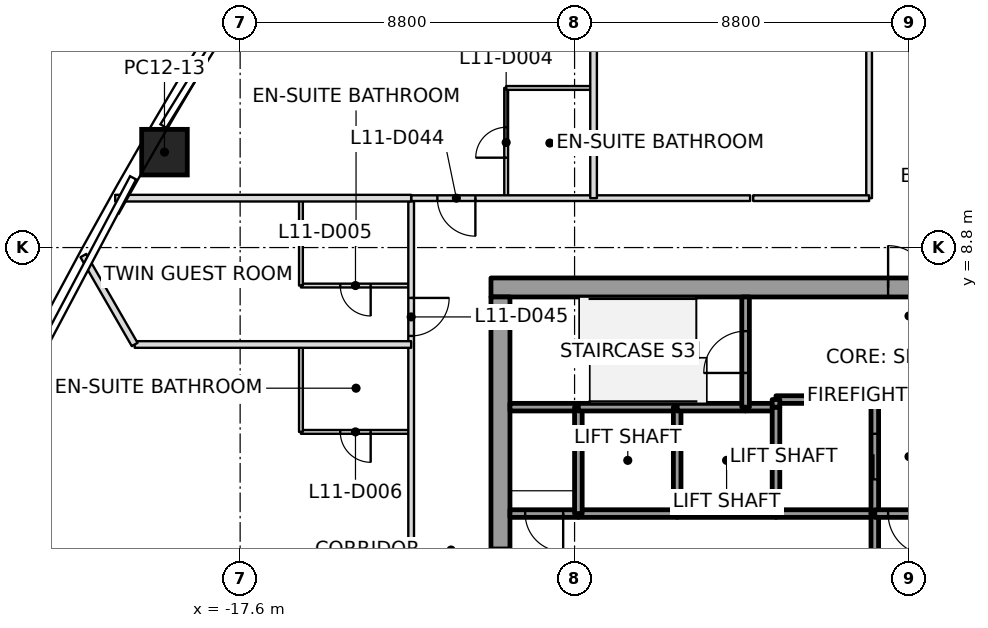
"""IFC4 building model, lengths in metres.
Left out: names, types, materials, properties, quantities, classifications, styles, units other than length and angle.
Written with IfcOpenShell. Run it as: python <this file> out.ifc"""

import sys

from ifc_helpers import new_model, si_unit, direction, frame, frame_2d, origin, origin_2d, place, context, subcontext, project, spatial, rectangle, extrude, element, fill, save


model = new_model("IFC4")
c1 = context("Model", 3, precision=1e-05, world=origin(), true_north=direction((0.0, 1.0)))
c2 = subcontext(c1, "Body", "Model", "MODEL_VIEW")
j1 = project(units=[si_unit("LENGTHUNIT", "METRE"), si_unit("PLANEANGLEUNIT", "RADIAN")], contexts=[c1])
p1 = place(None, origin())
s1 = spatial("IfcSite", under=j1, at=p1, CompositionType="ELEMENT")
p2 = place(p1, origin())
s2 = spatial("IfcBuilding", under=s1, at=p2, CompositionType="ELEMENT")
p3 = place(p2, frame((0.0, 0.0, 62.8)))
s3 = spatial("IfcBuildingStorey", under=s2, at=p3, CompositionType="ELEMENT", Elevation=62.8)
p4 = place(p3, frame((-19.591, 11.311, 0.0), z_axis=(0.010754697325, -0.00620209539, 0.999922932279), x_axis=(0.499971083285, 0.866042098195, -5.762411e-06)))
e1 = element("IfcColumn", 1, at=p4, inside=s3, PredefinedType="COLUMN", context=c2, shape_type="SweptSolid", body=[
    extrude(rectangle(XDim=1.2, YDim=1.2, at=origin_2d()), origin(), (0.0, 0.0, 1.0), 3.7),
])
p5 = place(p3, frame((-11.0, 7.75, 0.0), z_axis=(0.0, 0.0, 1.0), x_axis=(1.0, 0.0, 0.0)))
e2 = element("IfcWall", 2, at=p5, inside=s3, PredefinedType="SHEAR", context=c2, shape_type="SweptSolid", body=[
    extrude(rectangle(XDim=22.0, YDim=0.5, at=frame_2d((11.0, 0.0))), origin(), (0.0, 0.0, 1.0), 3.7),
])
p6 = place(p5, frame((10.45, 0.0, 0.0)))
e3 = element("IfcOpeningElement", 3, at=p6, cuts=e2, PredefinedType="OPENING", context=c2, shape_type="SweptSolid", body=[
    extrude(rectangle(XDim=1.1, YDim=2.1, at=frame_2d((0.55, 1.05))), frame((0.0, 0.25, 0.0), z_axis=(0.0, -1.0, 0.0), x_axis=(1.0, 0.0, 0.0)), (0.0, 0.0, 1.0), 0.5),
])
p7 = place(p3, frame((-10.75, -7.5, 0.0), z_axis=(0.0, 0.0, 1.0), x_axis=(0.0, 1.0, 0.0)))
e4 = element("IfcWall", 4, at=p7, inside=s3, PredefinedType="SHEAR", context=c2, shape_type="SweptSolid", body=[
    extrude(rectangle(XDim=15.0, YDim=0.5, at=frame_2d((7.5, 0.0))), origin(), (0.0, 0.0, 1.0), 3.7),
])
p8 = place(p7, frame((6.6, 0.0, 0.0)))
e5 = element("IfcOpeningElement", 5, at=p8, cuts=e4, PredefinedType="OPENING", context=c2, shape_type="SweptSolid", body=[
    extrude(rectangle(XDim=1.8, YDim=2.1, at=frame_2d((0.9, 1.05))), frame((0.0, 0.25, 0.0), z_axis=(0.0, -1.0, 0.0), x_axis=(1.0, 0.0, 0.0)), (0.0, 0.0, 1.0), 0.5),
])
p9 = place(p3, frame((-8.7, 1.8, 0.0), z_axis=(0.0, 0.0, 1.0), x_axis=(-1.0, 0.0, 0.0)))
e6 = element("IfcWall", 6, at=p9, inside=s3, PredefinedType="SOLIDWALL", context=c2, shape_type="SweptSolid", body=[
    extrude(rectangle(XDim=1.8, YDim=0.2, at=frame_2d((0.9, 0.0))), origin(), (0.0, 0.0, 1.0), 3.55),
])
p10 = place(p9, frame((0.4, 0.0, 0.0)))
e7 = element("IfcOpeningElement", 7, at=p10, cuts=e6, PredefinedType="OPENING", context=c2, shape_type="SweptSolid", body=[
    extrude(rectangle(XDim=1.0, YDim=2.1, at=frame_2d((0.5, 1.05))), frame((0.0, 0.1, 0.0), z_axis=(0.0, -1.0, 0.0), x_axis=(1.0, 0.0, 0.0)), (0.0, 0.0, 1.0), 0.2),
])
p11 = place(p3, frame((-8.7, 4.6, 0.0), z_axis=(0.0, 0.0, 1.0), x_axis=(-1.0, 0.0, 0.0)))
e8 = element("IfcWall", 8, at=p11, inside=s3, PredefinedType="SOLIDWALL", context=c2, shape_type="SweptSolid", body=[
    extrude(rectangle(XDim=1.8, YDim=0.2, at=frame_2d((0.9, 0.0))), origin(), (0.0, 0.0, 1.0), 3.55),
])
p12 = place(p3, frame((-6.1, 1.8, 0.0), z_axis=(0.0, 0.0, 1.0), x_axis=(-1.0, 0.0, 0.0)))
e9 = element("IfcWall", 9, at=p12, inside=s3, PredefinedType="SOLIDWALL", context=c2, shape_type="SweptSolid", body=[
    extrude(rectangle(XDim=2.6, YDim=0.2, at=frame_2d((1.3, 0.0))), origin(), (0.0, 0.0, 1.0), 3.55),
])
p13 = place(p3, frame((-8.7, 1.8, 0.0), z_axis=(0.0, 0.0, 1.0), x_axis=(0.0, 1.0, 0.0)))
e10 = element("IfcWall", 10, at=p13, inside=s3, PredefinedType="SOLIDWALL", context=c2, shape_type="SweptSolid", body=[
    extrude(rectangle(XDim=2.8, YDim=0.2, at=frame_2d((1.4, 0.0))), origin(), (0.0, 0.0, 1.0), 3.55),
])
p14 = place(p3, frame((-6.1, 4.6, 0.0), z_axis=(0.0, 0.0, 1.0), x_axis=(-1.0, 0.0, 0.0)))
e11 = element("IfcWall", 11, at=p14, inside=s3, PredefinedType="SOLIDWALL", context=c2, shape_type="SweptSolid", body=[
    extrude(rectangle(XDim=2.6, YDim=0.2, at=frame_2d((1.3, 0.0))), origin(), (0.0, 0.0, 1.0), 3.55),
])
p15 = place(p3, frame((-3.5, 1.8, 0.0), z_axis=(0.0, 0.0, 1.0), x_axis=(-1.0, 0.0, 0.0)))
e12 = element("IfcWall", 12, at=p15, inside=s3, PredefinedType="SOLIDWALL", context=c2, shape_type="SweptSolid", body=[
    extrude(rectangle(XDim=2.6, YDim=0.2, at=frame_2d((1.3, 0.0))), origin(), (0.0, 0.0, 1.0), 3.55),
])
p16 = place(p3, frame((-6.1, 1.8, 0.0), z_axis=(0.0, 0.0, 1.0), x_axis=(0.0, 1.0, 0.0)))
e13 = element("IfcWall", 13, at=p16, inside=s3, PredefinedType="SOLIDWALL", context=c2, shape_type="SweptSolid", body=[
    extrude(rectangle(XDim=2.8, YDim=0.2, at=frame_2d((1.4, 0.0))), origin(), (0.0, 0.0, 1.0), 3.55),
])
p17 = place(p3, frame((-4.3, 4.6, 0.0), z_axis=(0.0, 0.0, 1.0), x_axis=(-1.0, 0.0, 0.0)))
e14 = element("IfcWall", 14, at=p17, inside=s3, PredefinedType="SOLIDWALL", context=c2, shape_type="SweptSolid", body=[
    extrude(rectangle(XDim=1.8, YDim=0.2, at=frame_2d((0.9, 0.0))), origin(), (0.0, 0.0, 1.0), 3.55),
])
p18 = place(p3, frame((-3.5, 4.6, 0.0), z_axis=(0.0, 0.0, 1.0), x_axis=(-1.0, 0.0, 0.0)))
e15 = element("IfcWall", 15, at=p18, inside=s3, PredefinedType="SOLIDWALL", context=c2, shape_type="SweptSolid", body=[
    extrude(rectangle(XDim=0.8, YDim=0.2, at=frame_2d((0.4, 0.0))), origin(), (0.0, 0.0, 1.0), 3.55),
])
p19 = place(p3, frame((-4.3, 4.6, 0.0), z_axis=(0.0, 0.0, 1.0), x_axis=(0.0, 1.0, 0.0)))
e16 = element("IfcWall", 16, at=p19, inside=s3, PredefinedType="SOLIDWALL", context=c2, shape_type="SweptSolid", body=[
    extrude(rectangle(XDim=2.9, YDim=0.2, at=frame_2d((1.45, 0.0))), origin(), (0.0, 0.0, 1.0), 3.55),
])
p20 = place(p19, frame((0.9, 0.0, 0.0)))
e17 = element("IfcOpeningElement", 17, at=p20, cuts=e16, PredefinedType="OPENING", context=c2, shape_type="SweptSolid", body=[
    extrude(rectangle(XDim=1.1, YDim=2.1, at=frame_2d((0.55, 1.05))), frame((0.0, 0.1, 0.0), z_axis=(0.0, -1.0, 0.0), x_axis=(1.0, 0.0, 0.0)), (0.0, 0.0, 1.0), 0.2),
])
p21 = place(p3, frame((-0.9, 1.8, 0.0), z_axis=(0.0, 0.0, 1.0), x_axis=(-1.0, 0.0, 0.0)))
e18 = element("IfcWall", 18, at=p21, inside=s3, PredefinedType="SOLIDWALL", context=c2, shape_type="SweptSolid", body=[
    extrude(rectangle(XDim=2.6, YDim=0.2, at=frame_2d((1.3, 0.0))), origin(), (0.0, 0.0, 1.0), 3.55),
])
p22 = place(p3, frame((-3.5, 4.6, 0.0), z_axis=(0.0, 0.0, 1.0), x_axis=(0.0, -1.0, 0.0)))
e19 = element("IfcWall", 19, at=p22, inside=s3, PredefinedType="SOLIDWALL", context=c2, shape_type="SweptSolid", body=[
    extrude(rectangle(XDim=2.8, YDim=0.2, at=frame_2d((1.4, 0.0))), origin(), (0.0, 0.0, 1.0), 3.55),
])
p23 = place(p3, frame((-0.9, 1.8, 0.0), z_axis=(0.0, 0.0, 1.0), x_axis=(0.0, 1.0, 0.0)))
e20 = element("IfcWall", 20, at=p23, inside=s3, PredefinedType="SOLIDWALL", context=c2, shape_type="SweptSolid", body=[
    extrude(rectangle(XDim=3.0, YDim=0.2, at=frame_2d((1.5, 0.0))), origin(), (0.0, 0.0, 1.0), 3.55),
])
p24 = place(p23, frame((0.9, 0.0, 0.0)))
e21 = element("IfcOpeningElement", 21, at=p24, cuts=e20, PredefinedType="OPENING", context=c2, shape_type="SweptSolid", body=[
    extrude(rectangle(XDim=1.2, YDim=2.1, at=frame_2d((0.6, 1.05))), frame((0.0, 0.1, 0.0), z_axis=(0.0, -1.0, 0.0), x_axis=(1.0, 0.0, 0.0)), (0.0, 0.0, 1.0), 0.2),
])
p25 = place(p3, frame((-0.9, 4.8, 0.0), z_axis=(0.0, 0.0, 1.0), x_axis=(-1.0, 0.0, 0.0)))
e22 = element("IfcWall", 22, at=p25, inside=s3, PredefinedType="SOLIDWALL", context=c2, shape_type="SweptSolid", body=[
    extrude(rectangle(XDim=2.6, YDim=0.2, at=frame_2d((1.3, 0.0))), origin(), (0.0, 0.0, 1.0), 3.55),
])
p26 = place(p3, frame((-3.5, 4.8, 0.0), z_axis=(0.0, 0.0, 1.0), x_axis=(0.0, -1.0, 0.0)))
e23 = element("IfcWall", 23, at=p26, inside=s3, PredefinedType="SOLIDWALL", context=c2, shape_type="SweptSolid", body=[
    extrude(rectangle(XDim=0.2, YDim=0.2, at=frame_2d((0.1, 0.0))), origin(), (0.0, 0.0, 1.0), 3.55),
])
p27 = place(p3, frame((-0.9, 1.8, 0.0), z_axis=(0.0, 0.0, 1.0), x_axis=(0.0, -1.0, 0.0)))
e24 = element("IfcWall", 24, at=p27, inside=s3, PredefinedType="SOLIDWALL", context=c2, shape_type="SweptSolid", body=[
    extrude(rectangle(XDim=3.6, YDim=0.2, at=frame_2d((1.8, 0.0))), origin(), (0.0, 0.0, 1.0), 3.55),
])
p28 = place(p27, frame((1.05, 0.0, 0.0)))
e25 = element("IfcOpeningElement", 25, at=p28, cuts=e24, PredefinedType="OPENING", context=c2, shape_type="SweptSolid", body=[
    extrude(rectangle(XDim=1.5, YDim=2.1, at=frame_2d((0.75, 1.05))), frame((0.0, 0.1, 0.0), z_axis=(0.0, -1.0, 0.0), x_axis=(1.0, 0.0, 0.0)), (0.0, 0.0, 1.0), 0.2),
])
p29 = place(p3, frame((0.9, 1.8, 0.0), z_axis=(0.0, 0.0, 1.0), x_axis=(-1.0, 0.0, 0.0)))
e26 = element("IfcWall", 26, at=p29, inside=s3, PredefinedType="SOLIDWALL", context=c2, shape_type="SweptSolid", body=[
    extrude(rectangle(XDim=1.8, YDim=0.2, at=frame_2d((0.9, 0.0))), origin(), (0.0, 0.0, 1.0), 3.55),
])
p30 = place(p29, frame((0.35, 0.0, 0.0)))
e27 = element("IfcOpeningElement", 27, at=p30, cuts=e26, PredefinedType="OPENING", context=c2, shape_type="SweptSolid", body=[
    extrude(rectangle(XDim=1.1, YDim=2.1, at=frame_2d((0.55, 1.05))), frame((0.0, 0.1, 0.0), z_axis=(0.0, -1.0, 0.0), x_axis=(1.0, 0.0, 0.0)), (0.0, 0.0, 1.0), 0.2),
])
p31 = place(p3, frame((-13.1, 6.249, 0.0), z_axis=(0.0, 0.0, 1.0), x_axis=(-1.0, 0.0, 0.0)))
e28 = element("IfcWall", 28, at=p31, inside=s3, PredefinedType="PARTITIONING", context=c2, shape_type="SweptSolid", body=[
    extrude(rectangle(XDim=7.274, YDim=0.175, at=frame_2d((3.637, 0.0))), origin(), (0.0, 0.0, 1.0), 3.093),
])
p32 = place(p3, frame((-20.375, 6.249, 0.0), z_axis=(0.0, 0.0, 1.0), x_axis=(-0.50004574482, 0.86599899139, 0.0)))
e29 = element("IfcWall", 29, at=p32, inside=s3, PredefinedType="PARTITIONING", context=c2, shape_type="SweptSolid", body=[
    extrude(rectangle(XDim=2.702, YDim=0.175, at=frame_2d((1.351, 0.0))), origin(), (0.0, 0.0, 1.0), 2.934),
])
p33 = place(p3, frame((-13.1, 10.1, 0.0), z_axis=(0.0, 0.0, 1.0), x_axis=(-1.0, 0.0, 0.0)))
e30 = element("IfcWall", 30, at=p33, inside=s3, PredefinedType="PARTITIONING", context=c2, shape_type="SweptSolid", body=[
    extrude(rectangle(XDim=7.788, YDim=0.175, at=frame_2d((3.894, 0.0))), origin(), (0.0, 0.0, 1.0), 2.934),
])
p34 = place(p3, frame((-8.3, 10.1, 0.0), z_axis=(0.0, 0.0, 1.0), x_axis=(0.0, 1.0, 0.0)))
e31 = element("IfcWall", 31, at=p34, inside=s3, PredefinedType="PARTITIONING", context=c2, shape_type="SweptSolid", body=[
    extrude(rectangle(XDim=18.732, YDim=0.175, at=frame_2d((9.366, 0.0))), origin(), (0.0, 0.0, 1.0), 2.934),
])
p35 = place(p3, frame((-13.1, 10.02, 0.0), z_axis=(0.0, 0.0, 1.0), x_axis=(0.0, -1.0, 0.0)))
e32 = element("IfcWall", 32, at=p35, inside=s3, PredefinedType="PARTITIONING", context=c2, shape_type="SweptSolid", body=[
    extrude(rectangle(XDim=16.371, YDim=0.15, at=frame_2d((8.186, 0.0))), origin(), (0.0, 0.0, 1.0), 3.017),
])
p36 = place(p35, frame((2.545, 0.0, 0.0)))
e33 = element("IfcOpeningElement", 33, at=p36, cuts=e32, PredefinedType="OPENING", context=c2, shape_type="SweptSolid", body=[
    extrude(rectangle(XDim=1.0, YDim=2.1, at=frame_2d((0.5, 1.05))), frame((0.0, 0.075, 0.0), z_axis=(0.0, -1.0, 0.0), x_axis=(1.0, 0.0, 0.0)), (0.0, 0.0, 1.0), 0.15),
])
p37 = place(p35, frame((10.771, 0.0, 0.0)))
e34 = element("IfcOpeningElement", 34, at=p37, cuts=e32, PredefinedType="OPENING", context=c2, shape_type="SweptSolid", body=[
    extrude(rectangle(XDim=1.0, YDim=2.1, at=frame_2d((0.5, 1.05))), frame((0.0, 0.075, 0.0), z_axis=(0.0, -1.0, 0.0), x_axis=(1.0, 0.0, 0.0)), (0.0, 0.0, 1.0), 0.15),
])
p38 = place(p3, frame((-4.18, 10.1, 0.0), z_axis=(0.0, 0.0, 1.0), x_axis=(-1.0, 0.0, 0.0)))
e35 = element("IfcWall", 35, at=p38, inside=s3, PredefinedType="PARTITIONING", context=c2, shape_type="SweptSolid", body=[
    extrude(rectangle(XDim=8.92, YDim=0.15, at=frame_2d((4.46, 0.0))), origin(), (0.0, 0.0, 1.0), 2.947),
])
p39 = place(p38, frame((7.23, 0.0, 0.0)))
e36 = element("IfcOpeningElement", 36, at=p39, cuts=e35, PredefinedType="OPENING", context=c2, shape_type="SweptSolid", body=[
    extrude(rectangle(XDim=1.0, YDim=2.1, at=frame_2d((0.5, 1.05))), frame((0.0, 0.075, 0.0), z_axis=(0.0, -1.0, 0.0), x_axis=(1.0, 0.0, 0.0)), (0.0, 0.0, 1.0), 0.15),
])
p40 = place(p3, frame((-1.05, 27.233, 0.0), z_axis=(0.0, 0.0, 1.0), x_axis=(0.0, -1.0, 0.0)))
e37 = element("IfcWall", 37, at=p40, inside=s3, PredefinedType="PARTITIONING", context=c2, shape_type="SweptSolid", body=[
    extrude(rectangle(XDim=17.133, YDim=0.15, at=frame_2d((8.566, 0.0))), origin(), (0.0, 0.0, 1.0), 2.947),
])
p41 = place(p40, frame((9.257, 0.0, 0.0)))
e38 = element("IfcOpeningElement", 38, at=p41, cuts=e37, PredefinedType="OPENING", context=c2, shape_type="SweptSolid", body=[
    extrude(rectangle(XDim=1.0, YDim=2.1, at=frame_2d((0.5, 1.05))), frame((0.0, 0.075, 0.0), z_axis=(0.0, -1.0, 0.0), x_axis=(1.0, 0.0, 0.0)), (0.0, 0.0, 1.0), 0.15),
])
p42 = place(p3, frame((-1.05, 10.1, 0.0), z_axis=(0.0, 0.0, 1.0), x_axis=(-1.0, 0.0, 0.0)))
e39 = element("IfcWall", 39, at=p42, inside=s3, PredefinedType="PARTITIONING", context=c2, shape_type="SweptSolid", body=[
    extrude(rectangle(XDim=3.05, YDim=0.15, at=frame_2d((1.525, 0.0))), origin(), (0.0, 0.0, 1.0), 3.15),
])
p43 = place(p3, frame((-13.13, 3.949, 0.0), z_axis=(0.0, 0.0, 1.0), x_axis=(-1.0, 0.0, 0.0)))
e40 = element("IfcWall", 40, at=p43, inside=s3, PredefinedType="PARTITIONING", context=c2, shape_type="SweptSolid", body=[
    extrude(rectangle(XDim=2.87, YDim=0.1, at=frame_2d((1.435, 0.0))), origin(), (0.0, 0.0, 1.0), 3.093),
])
p44 = place(p43, frame((1.035, 0.0, 0.0)))
e41 = element("IfcOpeningElement", 41, at=p44, cuts=e40, PredefinedType="OPENING", context=c2, shape_type="SweptSolid", body=[
    extrude(rectangle(XDim=0.8, YDim=2.1, at=frame_2d((0.4, 1.05))), frame((0.0, 0.05, 0.0), z_axis=(0.0, -1.0, 0.0), x_axis=(1.0, 0.0, 0.0)), (0.0, 0.0, 1.0), 0.1),
])
p45 = place(p3, frame((-16.0, 3.949, 0.0), z_axis=(0.0, 0.0, 1.0), x_axis=(0.0, 1.0, 0.0)))
e42 = element("IfcWall", 42, at=p45, inside=s3, PredefinedType="PARTITIONING", context=c2, shape_type="SweptSolid", body=[
    extrude(rectangle(XDim=2.27, YDim=0.1, at=frame_2d((1.135, 0.0))), origin(), (0.0, 0.0, 1.0), 3.093),
])
p46 = place(p3, frame((-13.13, 7.8, 0.0), z_axis=(0.0, 0.0, 1.0), x_axis=(-1.0, 0.0, 0.0)))
e43 = element("IfcWall", 43, at=p46, inside=s3, PredefinedType="PARTITIONING", context=c2, shape_type="SweptSolid", body=[
    extrude(rectangle(XDim=2.87, YDim=0.1, at=frame_2d((1.435, 0.0))), origin(), (0.0, 0.0, 1.0), 3.15),
])
p47 = place(p46, frame((1.035, 0.0, 0.0)))
e44 = element("IfcOpeningElement", 44, at=p47, cuts=e43, PredefinedType="OPENING", context=c2, shape_type="SweptSolid", body=[
    extrude(rectangle(XDim=0.8, YDim=2.1, at=frame_2d((0.4, 1.05))), frame((0.0, 0.05, 0.0), z_axis=(0.0, -1.0, 0.0), x_axis=(1.0, 0.0, 0.0)), (0.0, 0.0, 1.0), 0.1),
])
p48 = place(p3, frame((-16.0, 7.8, 0.0), z_axis=(0.0, 0.0, 1.0), x_axis=(0.0, 1.0, 0.0)))
e45 = element("IfcWall", 45, at=p48, inside=s3, PredefinedType="PARTITIONING", context=c2, shape_type="SweptSolid", body=[
    extrude(rectangle(XDim=2.27, YDim=0.1, at=frame_2d((1.135, 0.0))), origin(), (0.0, 0.0, 1.0), 3.15),
])
p49 = place(p3, frame((-10.6, 10.13, 0.0), z_axis=(0.0, 0.0, 1.0), x_axis=(0.0, 1.0, 0.0)))
e46 = element("IfcWall", 46, at=p49, inside=s3, PredefinedType="PARTITIONING", context=c2, shape_type="SweptSolid", body=[
    extrude(rectangle(XDim=2.87, YDim=0.1, at=frame_2d((1.435, 0.0))), origin(), (0.0, 0.0, 1.0), 3.15),
])
p50 = place(p49, frame((1.035, 0.0, 0.0)))
e47 = element("IfcOpeningElement", 47, at=p50, cuts=e46, PredefinedType="OPENING", context=c2, shape_type="SweptSolid", body=[
    extrude(rectangle(XDim=0.8, YDim=2.1, at=frame_2d((0.4, 1.05))), frame((0.0, 0.05, 0.0), z_axis=(0.0, -1.0, 0.0), x_axis=(1.0, 0.0, 0.0)), (0.0, 0.0, 1.0), 0.1),
])
p51 = place(p3, frame((-10.6, 13.0, 0.0), z_axis=(0.0, 0.0, 1.0), x_axis=(1.0, 0.0, 0.0)))
e48 = element("IfcWall", 48, at=p51, inside=s3, PredefinedType="PARTITIONING", context=c2, shape_type="SweptSolid", body=[
    extrude(rectangle(XDim=2.27, YDim=0.1, at=frame_2d((1.135, 0.0))), origin(), (0.0, 0.0, 1.0), 2.947),
])
p52 = place(p39, origin())
e49 = element("IfcDoor", 49, at=p52, inside=s3, OperationType="SINGLE_SWING_RIGHT", PredefinedType="DOOR", context=c2, shape_type="SweptSolid", body=[
    extrude(rectangle(XDim=1.0, YDim=2.1, at=frame_2d((0.5, 1.05))), frame((0.0, 0.025, 0.0), z_axis=(0.0, -1.0, 0.0), x_axis=(1.0, 0.0, 0.0)), (0.0, 0.0, 1.0), 0.05),
])
fill(e36, e49)
p53 = place(p50, origin())
e50 = element("IfcDoor", 50, at=p53, inside=s3, OperationType="SINGLE_SWING_LEFT", PredefinedType="DOOR", context=c2, shape_type="SweptSolid", body=[
    extrude(rectangle(XDim=0.8, YDim=2.1, at=frame_2d((0.4, 1.05))), frame((0.0, 0.025, 0.0), z_axis=(0.0, -1.0, 0.0), x_axis=(1.0, 0.0, 0.0)), (0.0, 0.0, 1.0), 0.05),
])
fill(e47, e50)
p54 = place(p36, origin())
e51 = element("IfcDoor", 51, at=p54, inside=s3, OperationType="SINGLE_SWING_LEFT", PredefinedType="DOOR", context=c2, shape_type="SweptSolid", body=[
    extrude(rectangle(XDim=1.0, YDim=2.1, at=frame_2d((0.5, 1.05))), frame((0.0, 0.025, 0.0), z_axis=(0.0, -1.0, 0.0), x_axis=(1.0, 0.0, 0.0)), (0.0, 0.0, 1.0), 0.05),
])
fill(e33, e51)
p55 = place(p47, origin())
e52 = element("IfcDoor", 52, at=p55, inside=s3, OperationType="SINGLE_SWING_RIGHT", PredefinedType="DOOR", context=c2, shape_type="SweptSolid", body=[
    extrude(rectangle(XDim=0.8, YDim=2.1, at=frame_2d((0.4, 1.05))), frame((0.0, 0.025, 0.0), z_axis=(0.0, -1.0, 0.0), x_axis=(1.0, 0.0, 0.0)), (0.0, 0.0, 1.0), 0.05),
])
fill(e44, e52)
p56 = place(p44, origin())
e53 = element("IfcDoor", 53, at=p56, inside=s3, OperationType="SINGLE_SWING_LEFT", PredefinedType="DOOR", context=c2, shape_type="SweptSolid", body=[
    extrude(rectangle(XDim=0.8, YDim=2.1, at=frame_2d((0.4, 1.05))), frame((0.0, 0.025, 0.0), z_axis=(0.0, -1.0, 0.0), x_axis=(1.0, 0.0, 0.0)), (0.0, 0.0, 1.0), 0.05),
])
fill(e41, e53)
p57 = place(p24, origin())
e54 = element("IfcDoor", 54, at=p57, inside=s3, OperationType="SLIDING_TO_RIGHT", PredefinedType="DOOR", context=c2, shape_type="SweptSolid", body=[
    extrude(rectangle(XDim=1.2, YDim=2.1, at=frame_2d((0.6, 1.05))), frame((0.0, 0.025, 0.0), z_axis=(0.0, -1.0, 0.0), x_axis=(1.0, 0.0, 0.0)), (0.0, 0.0, 1.0), 0.05),
])
fill(e21, e54)
p58 = place(p30, origin())
e55 = element("IfcDoor", 55, at=p58, inside=s3, OperationType="SINGLE_SWING_RIGHT", PredefinedType="DOOR", context=c2, shape_type="SweptSolid", body=[
    extrude(rectangle(XDim=1.1, YDim=2.1, at=frame_2d((0.55, 1.05))), frame((0.0, 0.025, 0.0), z_axis=(0.0, -1.0, 0.0), x_axis=(1.0, 0.0, 0.0)), (0.0, 0.0, 1.0), 0.05),
])
fill(e27, e55)
p59 = place(p10, origin())
e56 = element("IfcDoor", 56, at=p59, inside=s3, OperationType="SINGLE_SWING_LEFT", PredefinedType="DOOR", context=c2, shape_type="SweptSolid", body=[
    extrude(rectangle(XDim=1.0, YDim=2.1, at=frame_2d((0.5, 1.05))), frame((0.0, 0.025, 0.0), z_axis=(0.0, -1.0, 0.0), x_axis=(1.0, 0.0, 0.0)), (0.0, 0.0, 1.0), 0.05),
])
fill(e7, e56)
p60 = place(p20, origin())
e57 = element("IfcDoor", 57, at=p60, inside=s3, OperationType="SINGLE_SWING_RIGHT", PredefinedType="DOOR", context=c2, shape_type="SweptSolid", body=[
    extrude(rectangle(XDim=1.1, YDim=2.1, at=frame_2d((0.55, 1.05))), frame((0.0, 0.025, 0.0), z_axis=(0.0, -1.0, 0.0), x_axis=(1.0, 0.0, 0.0)), (0.0, 0.0, 1.0), 0.05),
])
fill(e17, e57)
p61 = place(p8, origin())
e58 = element("IfcDoor", 58, at=p61, inside=s3, OperationType="DOUBLE_DOOR_SINGLE_SWING", PredefinedType="DOOR", context=c2, shape_type="SweptSolid", body=[
    extrude(rectangle(XDim=1.8, YDim=2.1, at=frame_2d((0.9, 1.05))), frame((0.0, 0.025, 0.0), z_axis=(0.0, -1.0, 0.0), x_axis=(1.0, 0.0, 0.0)), (0.0, 0.0, 1.0), 0.05),
])
fill(e5, e58)
p62 = place(p6, origin())
e59 = element("IfcDoor", 59, at=p62, inside=s3, OperationType="SINGLE_SWING_RIGHT", PredefinedType="DOOR", context=c2, shape_type="SweptSolid", body=[
    extrude(rectangle(XDim=1.1, YDim=2.1, at=frame_2d((0.55, 1.05))), frame((0.0, 0.025, 0.0), z_axis=(0.0, -1.0, 0.0), x_axis=(1.0, 0.0, 0.0)), (0.0, 0.0, 1.0), 0.05),
])
fill(e3, e59)
save(model, sys.argv[1])
